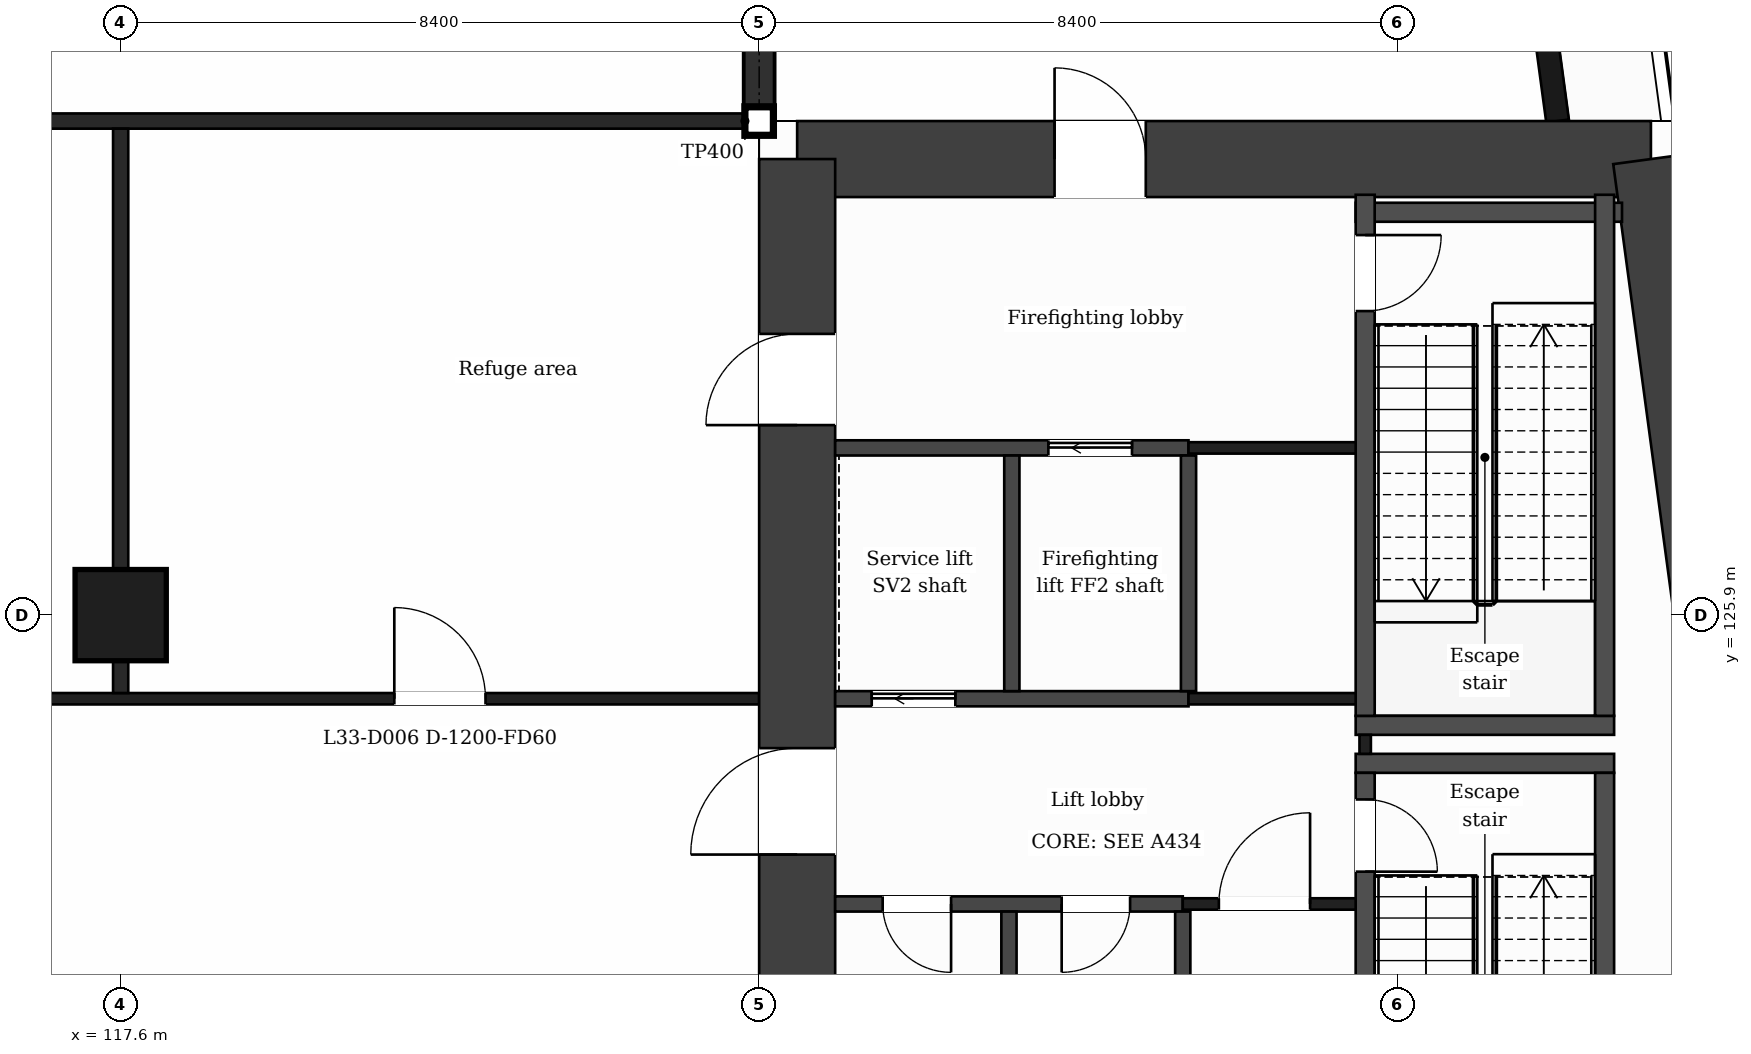
"""IFC4 building model, lengths in metres.
Left out: names, types, materials, properties, quantities, classifications, styles, units other than length and angle.
Written with IfcOpenShell. Run it as: python <this file> out.ifc"""

import sys

from ifc_helpers import new_model, si_unit, direction, frame, frame_2d, origin, origin_2d, place, context, subcontext, project, spatial, rectangle, extrude, element, fill, save


model = new_model("IFC4")
c1 = context("Model", 3, precision=1e-05, world=origin(), true_north=direction((0.0, 1.0)))
c2 = subcontext(c1, "Body", "Model", "MODEL_VIEW")
j1 = project(units=[si_unit("LENGTHUNIT", "METRE"), si_unit("PLANEANGLEUNIT", "RADIAN")], contexts=[c1])
p1 = place(None, origin())
s1 = spatial("IfcSite", under=j1, at=p1, CompositionType="ELEMENT")
p2 = place(p1, origin())
s2 = spatial("IfcBuilding", under=s1, at=p2, CompositionType="ELEMENT")
p3 = place(p2, frame((0.0, 0.0, 142.8)))
s3 = spatial("IfcBuildingStorey", under=s2, at=p3, CompositionType="ELEMENT", Elevation=142.8)
p4 = place(p3, frame((126.5, 131.9, 0.0), z_axis=(0.0, 0.0, 1.0), x_axis=(1.0, 0.0, 0.0)))
e1 = element("IfcWall", 1, at=p4, inside=s3, PredefinedType="SHEAR", context=c2, shape_type="SweptSolid", body=[
    extrude(rectangle(XDim=11.232, YDim=1.0, at=frame_2d((5.616, 0.0))), origin(), (0.0, 0.0, 1.0), 5.0),
])
p5 = place(p4, frame((3.386, 0.0, 0.0)))
e2 = element("IfcOpeningElement", 2, at=p5, cuts=e1, PredefinedType="OPENING", context=c2, shape_type="SweptSolid", body=[
    extrude(rectangle(XDim=1.2, YDim=2.1, at=frame_2d((0.6, 1.05))), frame((0.0, 0.51, 0.0), z_axis=(0.0, -1.0, 0.0), x_axis=(1.0, 0.0, 0.0)), (0.0, 0.0, 1.0), 1.02),
])
p6 = place(p3, frame((137.732, 131.9, 0.0), z_axis=(0.0, 0.0, 1.0), x_axis=(0.133411141623, -0.991060778808, 0.0)))
e3 = element("IfcWall", 3, at=p6, inside=s3, PredefinedType="SHEAR", context=c2, shape_type="SweptSolid", body=[
    extrude(rectangle(XDim=21.189, YDim=1.0, at=frame_2d((10.595, 0.0))), origin(), (0.0, 0.0, 1.0), 5.0),
])
p7 = place(p3, frame((126.5, 110.9, 0.0), z_axis=(0.0, 0.0, 1.0), x_axis=(0.0, 1.0, 0.0)))
e4 = element("IfcWall", 4, at=p7, inside=s3, PredefinedType="SHEAR", context=c2, shape_type="SweptSolid", body=[
    extrude(rectangle(XDim=21.0, YDim=1.0, at=frame_2d((10.5, 0.0))), origin(), (0.0, 0.0, 1.0), 5.0),
])
p8 = place(p7, frame((17.5, 0.0, 0.0)))
e5 = element("IfcOpeningElement", 5, at=p8, cuts=e4, PredefinedType="OPENING", context=c2, shape_type="SweptSolid", body=[
    extrude(rectangle(XDim=1.2, YDim=2.1, at=frame_2d((0.6, 1.05))), frame((0.0, 0.51, 0.0), z_axis=(0.0, -1.0, 0.0), x_axis=(1.0, 0.0, 0.0)), (0.0, 0.0, 1.0), 1.02),
])
p9 = place(p7, frame((11.85, 0.0, 0.0)))
e6 = element("IfcOpeningElement", 6, at=p9, cuts=e4, PredefinedType="OPENING", context=c2, shape_type="SweptSolid", body=[
    extrude(rectangle(XDim=1.4, YDim=2.1, at=frame_2d((0.7, 1.05))), frame((0.0, 0.51, 0.0), z_axis=(0.0, -1.0, 0.0), x_axis=(1.0, 0.0, 0.0)), (0.0, 0.0, 1.0), 1.02),
])
p10 = place(p3, frame((117.6, 125.9, 0.0), z_axis=(0.0, 0.0, 1.0), x_axis=(1.0, 0.0, 0.0)))
e7 = element("IfcColumn", 7, at=p10, inside=s3, PredefinedType="COLUMN", context=c2, shape_type="SweptSolid", body=[
    extrude(rectangle(XDim=1.2, YDim=1.2, at=origin_2d()), origin(), (0.0, 0.0, 1.0), 5.0),
])
p11 = place(p3, frame((136.504, 132.4, 0.0), z_axis=(0.0, 0.0, 1.0), x_axis=(-0.133399697462, 0.99106231929, 0.0)))
e8 = element("IfcWall", 8, at=p11, inside=s3, PredefinedType="SOLIDWALL", context=c2, shape_type="SweptSolid", body=[
    extrude(rectangle(XDim=6.74, YDim=0.3, at=frame_2d((3.37, 0.0))), origin(), (0.0, 0.0, 1.0), 4.68),
])
p12 = place(p11, frame((1.115, 0.0, 0.0)))
e9 = element("IfcOpeningElement", 9, at=p12, cuts=e8, PredefinedType="OPENING", context=c2, shape_type="SweptSolid", body=[
    extrude(rectangle(XDim=1.2, YDim=2.4, at=frame_2d((0.6, 1.2))), frame((0.0, 0.16, 0.0), z_axis=(0.0, -1.0, 0.0), x_axis=(1.0, 0.0, 0.0)), (0.0, 0.0, 1.0), 0.32),
])
p13 = place(p3, frame((127.0, 122.1, 0.0), z_axis=(0.0, 0.0, 1.0), x_axis=(1.0, 0.0, 0.0)))
e10 = element("IfcWall", 10, at=p13, inside=s3, PredefinedType="PARTITIONING", context=c2, shape_type="SweptSolid", body=[
    extrude(rectangle(XDim=4.573, YDim=0.2, at=frame_2d((2.287, 0.0))), origin(), (0.0, 0.0, 1.0), 4.68),
])
p14 = place(p13, frame((2.98, 0.0, 0.0)))
e11 = element("IfcOpeningElement", 11, at=p14, cuts=e10, PredefinedType="OPENING", context=c2, shape_type="SweptSolid", body=[
    extrude(rectangle(XDim=0.9, YDim=2.1, at=frame_2d((0.45, 1.05))), frame((0.0, 0.11, 0.0), z_axis=(0.0, -1.0, 0.0), x_axis=(1.0, 0.0, 0.0)), (0.0, 0.0, 1.0), 0.22),
])
p15 = place(p13, frame((0.625, 0.0, 0.0)))
e12 = element("IfcOpeningElement", 12, at=p15, cuts=e10, PredefinedType="OPENING", context=c2, shape_type="SweptSolid", body=[
    extrude(rectangle(XDim=0.9, YDim=2.1, at=frame_2d((0.45, 1.05))), frame((0.0, 0.11, 0.0), z_axis=(0.0, -1.0, 0.0), x_axis=(1.0, 0.0, 0.0)), (0.0, 0.0, 1.0), 0.22),
])
p16 = place(p3, frame((131.573, 122.1, 0.0), z_axis=(0.0, 0.0, 1.0), x_axis=(1.0, 0.0, 0.0)))
e13 = element("IfcWall", 13, at=p16, inside=s3, PredefinedType="PARTITIONING", context=c2, shape_type="SweptSolid", body=[
    extrude(rectangle(XDim=2.4, YDim=0.15, at=frame_2d((1.2, 0.0))), origin(), (0.0, 0.0, 1.0), 4.68),
])
p17 = place(p16, frame((0.475, 0.0, 0.0)))
e14 = element("IfcOpeningElement", 14, at=p17, cuts=e13, PredefinedType="OPENING", context=c2, shape_type="SweptSolid", body=[
    extrude(rectangle(XDim=1.2, YDim=2.1, at=frame_2d((0.6, 1.05))), frame((0.0, 0.085, 0.0), z_axis=(0.0, -1.0, 0.0), x_axis=(1.0, 0.0, 0.0)), (0.0, 0.0, 1.0), 0.17),
])
for number, where, z_axis, x_axis in (
    (15, (133.848, 123.95, 0.0), (0.0, 0.0, 1.0), (1.0, 0.0, 0.0)),
    (16, (133.848, 124.45, 0.0), (0.0, 0.0, 1.0), (1.0, 0.0, 0.0)),
):
    element("IfcWall", number, at=place(p3, frame(where, z_axis=z_axis, x_axis=x_axis)), inside=s3, PredefinedType="PARTITIONING", context=c2, shape_type="SweptSolid", body=[
        extrude(rectangle(XDim=3.4, YDim=0.25, at=frame_2d((1.7, 0.0))), origin(), (0.0, 0.0, 1.0), 4.68),
    ])
p18 = place(p3, frame((127.0, 124.8, 0.0), z_axis=(0.0, 0.0, 1.0), x_axis=(1.0, 0.0, 0.0)))
e17 = element("IfcWall", 17, at=p18, inside=s3, PredefinedType="PARTITIONING", context=c2, shape_type="SweptSolid", body=[
    extrude(rectangle(XDim=4.649, YDim=0.2, at=frame_2d((2.324, 0.0))), origin(), (0.0, 0.0, 1.0), 4.68),
])
p19 = place(p18, frame((0.481, 0.0, 0.0)))
e18 = element("IfcOpeningElement", 18, at=p19, cuts=e17, PredefinedType="OPENING", context=c2, shape_type="SweptSolid", body=[
    extrude(rectangle(XDim=1.1, YDim=2.1, at=frame_2d((0.55, 1.05))), frame((0.0, 0.11, 0.0), z_axis=(0.0, -1.0, 0.0), x_axis=(1.0, 0.0, 0.0)), (0.0, 0.0, 1.0), 0.22),
])
p20 = place(p3, frame((131.649, 124.8, 0.0), z_axis=(0.0, 0.0, 1.0), x_axis=(1.0, 0.0, 0.0)))
e19 = element("IfcWall", 19, at=p20, inside=s3, PredefinedType="PARTITIONING", context=c2, shape_type="SweptSolid", body=[
    extrude(rectangle(XDim=2.449, YDim=0.15, at=frame_2d((1.225, 0.0))), origin(), (0.0, 0.0, 1.0), 4.68),
])
p21 = place(p3, frame((100.8, 124.8, 0.0), z_axis=(0.0, 0.0, 1.0), x_axis=(1.0, 0.0, 0.0)))
e20 = element("IfcWall", 20, at=p21, inside=s3, PredefinedType="PARTITIONING", context=c2, shape_type="SweptSolid", body=[
    extrude(rectangle(XDim=25.2, YDim=0.15, at=frame_2d((12.6, 0.0))), origin(), (0.0, 0.0, 1.0), 4.68),
])
p22 = place(p21, frame((3.6, 0.0, 0.0)))
e21 = element("IfcOpeningElement", 21, at=p22, cuts=e20, PredefinedType="OPENING", context=c2, shape_type="SweptSolid", body=[
    extrude(rectangle(XDim=1.2, YDim=2.1, at=frame_2d((0.6, 1.05))), frame((0.0, 0.085, 0.0), z_axis=(0.0, -1.0, 0.0), x_axis=(1.0, 0.0, 0.0)), (0.0, 0.0, 1.0), 0.17),
])
p23 = place(p21, frame((12.0, 0.0, 0.0)))
e22 = element("IfcOpeningElement", 22, at=p23, cuts=e20, PredefinedType="OPENING", context=c2, shape_type="SweptSolid", body=[
    extrude(rectangle(XDim=1.2, YDim=2.1, at=frame_2d((0.6, 1.05))), frame((0.0, 0.085, 0.0), z_axis=(0.0, -1.0, 0.0), x_axis=(1.0, 0.0, 0.0)), (0.0, 0.0, 1.0), 0.17),
])
p24 = place(p21, frame((20.4, 0.0, 0.0)))
e23 = element("IfcOpeningElement", 23, at=p24, cuts=e20, PredefinedType="OPENING", context=c2, shape_type="SweptSolid", body=[
    extrude(rectangle(XDim=1.2, YDim=2.1, at=frame_2d((0.6, 1.05))), frame((0.0, 0.085, 0.0), z_axis=(0.0, -1.0, 0.0), x_axis=(1.0, 0.0, 0.0)), (0.0, 0.0, 1.0), 0.17),
])
p25 = place(p3, frame((127.0, 128.1, 0.0), z_axis=(0.0, 0.0, 1.0), x_axis=(1.0, 0.0, 0.0)))
e24 = element("IfcWall", 24, at=p25, inside=s3, PredefinedType="PARTITIONING", context=c2, shape_type="SweptSolid", body=[
    extrude(rectangle(XDim=4.649, YDim=0.2, at=frame_2d((2.324, 0.0))), origin(), (0.0, 0.0, 1.0), 4.68),
])
p26 = place(p25, frame((2.805, 0.0, 0.0)))
e25 = element("IfcOpeningElement", 25, at=p26, cuts=e24, PredefinedType="OPENING", context=c2, shape_type="SweptSolid", body=[
    extrude(rectangle(XDim=1.1, YDim=2.1, at=frame_2d((0.55, 1.05))), frame((0.0, 0.11, 0.0), z_axis=(0.0, -1.0, 0.0), x_axis=(1.0, 0.0, 0.0)), (0.0, 0.0, 1.0), 0.22),
])
p27 = place(p3, frame((131.649, 128.1, 0.0), z_axis=(0.0, 0.0, 1.0), x_axis=(1.0, 0.0, 0.0)))
e26 = element("IfcWall", 26, at=p27, inside=s3, PredefinedType="PARTITIONING", context=c2, shape_type="SweptSolid", body=[
    extrude(rectangle(XDim=2.324, YDim=0.15, at=frame_2d((1.162, 0.0))), origin(), (0.0, 0.0, 1.0), 4.68),
])
p28 = place(p3, frame((133.848, 131.2, 0.0), z_axis=(0.0, 0.0, 1.0), x_axis=(1.0, 0.0, 0.0)))
e27 = element("IfcWall", 27, at=p28, inside=s3, PredefinedType="PARTITIONING", context=c2, shape_type="SweptSolid", body=[
    extrude(rectangle(XDim=3.504, YDim=0.25, at=frame_2d((1.752, 0.0))), origin(), (0.0, 0.0, 1.0), 4.68),
])
p29 = place(p3, frame((100.7, 132.4, 0.0), z_axis=(0.0, 0.0, 1.0), x_axis=(1.0, 0.0, 0.0)))
e28 = element("IfcWall", 28, at=p29, inside=s3, PredefinedType="PARTITIONING", context=c2, shape_type="SweptSolid", body=[
    extrude(rectangle(XDim=25.4, YDim=0.2, at=frame_2d((12.7, 0.0))), origin(), (0.0, 0.0, 1.0), 4.68),
])
p30 = place(p29, frame((3.7, 0.0, 0.0)))
e29 = element("IfcOpeningElement", 29, at=p30, cuts=e28, PredefinedType="OPENING", context=c2, shape_type="SweptSolid", body=[
    extrude(rectangle(XDim=1.2, YDim=2.1, at=frame_2d((0.6, 1.05))), frame((0.0, 0.11, 0.0), z_axis=(0.0, -1.0, 0.0), x_axis=(1.0, 0.0, 0.0)), (0.0, 0.0, 1.0), 0.22),
])
p31 = place(p3, frame((117.6, 124.875, 0.0), z_axis=(0.0, 0.0, 1.0), x_axis=(0.0, 1.0, 0.0)))
e30 = element("IfcWall", 30, at=p31, inside=s3, PredefinedType="PARTITIONING", context=c2, shape_type="SweptSolid", body=[
    extrude(rectangle(XDim=7.425, YDim=0.2, at=frame_2d((3.712, 0.0))), origin(), (0.0, 0.0, 1.0), 4.68),
])
p32 = place(p3, frame((126.0, 132.5, 0.0), z_axis=(0.0, 0.0, 1.0), x_axis=(0.0, 1.0, 0.0)))
e31 = element("IfcWall", 31, at=p32, inside=s3, PredefinedType="PARTITIONING", context=c2, shape_type="SweptSolid", body=[
    extrude(rectangle(XDim=10.51, YDim=0.2, at=frame_2d((5.255, 0.0))), origin(), (0.0, 0.0, 1.0), 4.68),
])
for number, where, z_axis, x_axis in (
    (32, (129.287, 118.9, 0.0), (0.0, 0.0, 1.0), (0.0, 1.0, 0.0)),
    (33, (129.324, 124.9, 0.0), (0.0, 0.0, 1.0), (0.0, 1.0, 0.0)),
):
    element("IfcWall", number, at=place(p3, frame(where, z_axis=z_axis, x_axis=x_axis)), inside=s3, PredefinedType="PARTITIONING", context=c2, shape_type="SweptSolid", body=[
        extrude(rectangle(XDim=3.1, YDim=0.2, at=frame_2d((1.55, 0.0))), origin(), (0.0, 0.0, 1.0), 4.68),
    ])
p33 = place(p3, frame((131.573, 116.97, 0.0), z_axis=(0.0, 0.0, 1.0), x_axis=(0.0, 1.0, 0.0)))
e34 = element("IfcWall", 34, at=p33, inside=s3, PredefinedType="PARTITIONING", context=c2, shape_type="SweptSolid", body=[
    extrude(rectangle(XDim=5.03, YDim=0.2, at=frame_2d((2.515, 0.0))), origin(), (0.0, 0.0, 1.0), 4.68),
])
p34 = place(p33, frame((0.58, 0.0, 0.0)))
e35 = element("IfcOpeningElement", 35, at=p34, cuts=e34, PredefinedType="OPENING", context=c2, shape_type="SweptSolid", body=[
    extrude(rectangle(XDim=0.9, YDim=2.1, at=frame_2d((0.45, 1.05))), frame((0.0, 0.11, 0.0), z_axis=(0.0, -1.0, 0.0), x_axis=(1.0, 0.0, 0.0)), (0.0, 0.0, 1.0), 0.22),
])
p35 = place(p3, frame((131.649, 124.9, 0.0), z_axis=(0.0, 0.0, 1.0), x_axis=(0.0, 1.0, 0.0)))
e36 = element("IfcWall", 36, at=p35, inside=s3, PredefinedType="PARTITIONING", context=c2, shape_type="SweptSolid", body=[
    extrude(rectangle(XDim=3.1, YDim=0.2, at=frame_2d((1.55, 0.0))), origin(), (0.0, 0.0, 1.0), 4.68),
])
p36 = place(p3, frame((133.973, 124.075, 0.0), z_axis=(0.0, 0.0, 1.0), x_axis=(0.0, 1.0, 0.0)))
e37 = element("IfcWall", 37, at=p36, inside=s3, PredefinedType="PARTITIONING", context=c2, shape_type="SweptSolid", body=[
    extrude(rectangle(XDim=0.25, YDim=0.15, at=frame_2d((0.125, 0.0))), origin(), (0.0, 0.0, 1.0), 4.68),
])
p37 = place(p3, frame((133.973, 116.97, 0.0), z_axis=(0.0, 0.0, 1.0), x_axis=(0.0, 1.0, 0.0)))
e38 = element("IfcWall", 38, at=p37, inside=s3, PredefinedType="PARTITIONING", context=c2, shape_type="SweptSolid", body=[
    extrude(rectangle(XDim=6.855, YDim=0.25, at=frame_2d((3.427, 0.0))), origin(), (0.0, 0.0, 1.0), 4.68),
])
p38 = place(p37, frame((5.555, 0.0, 0.0)))
e39 = element("IfcOpeningElement", 39, at=p38, cuts=e38, PredefinedType="OPENING", context=c2, shape_type="SweptSolid", body=[
    extrude(rectangle(XDim=0.95, YDim=2.1, at=frame_2d((0.475, 1.05))), frame((0.0, 0.135, 0.0), z_axis=(0.0, -1.0, 0.0), x_axis=(1.0, 0.0, 0.0)), (0.0, 0.0, 1.0), 0.27),
])
p39 = place(p3, frame((133.973, 124.575, 0.0), z_axis=(0.0, 0.0, 1.0), x_axis=(0.0, 1.0, 0.0)))
e40 = element("IfcWall", 40, at=p39, inside=s3, PredefinedType="PARTITIONING", context=c2, shape_type="SweptSolid", body=[
    extrude(rectangle(XDim=6.855, YDim=0.25, at=frame_2d((3.427, 0.0))), origin(), (0.0, 0.0, 1.0), 4.68),
])
p40 = place(p39, frame((5.325, 0.0, 0.0)))
e41 = element("IfcOpeningElement", 41, at=p40, cuts=e40, PredefinedType="OPENING", context=c2, shape_type="SweptSolid", body=[
    extrude(rectangle(XDim=1.0, YDim=2.1, at=frame_2d((0.5, 1.05))), frame((0.0, 0.135, 0.0), z_axis=(0.0, -1.0, 0.0), x_axis=(1.0, 0.0, 0.0)), (0.0, 0.0, 1.0), 0.27),
])
for number, where, z_axis, x_axis in (
    (42, (137.123, 116.97, 0.0), (0.0, 0.0, 1.0), (0.0, 1.0, 0.0)),
    (43, (137.123, 124.575, 0.0), (0.0, 0.0, 1.0), (0.0, 1.0, 0.0)),
):
    element("IfcWall", number, at=place(p3, frame(where, z_axis=z_axis, x_axis=x_axis)), inside=s3, PredefinedType="PARTITIONING", context=c2, shape_type="SweptSolid", body=[
        extrude(rectangle(XDim=6.855, YDim=0.25, at=frame_2d((3.427, 0.0))), origin(), (0.0, 0.0, 1.0), 4.68),
    ])
p41 = place(p24, origin())
e44 = element("IfcDoor", 44, at=p41, inside=s3, OperationType="SINGLE_SWING_LEFT", PredefinedType="DOOR", context=c2, shape_type="SweptSolid", body=[
    extrude(rectangle(XDim=1.2, YDim=2.1, at=frame_2d((0.6, 1.05))), frame((0.0, 0.025, 0.0), z_axis=(0.0, -1.0, 0.0), x_axis=(1.0, 0.0, 0.0)), (0.0, 0.0, 1.0), 0.05),
])
fill(e23, e44)
p42 = place(p17, origin())
e45 = element("IfcDoor", 45, at=p42, inside=s3, OperationType="SINGLE_SWING_RIGHT", PredefinedType="DOOR", context=c2, shape_type="SweptSolid", body=[
    extrude(rectangle(XDim=1.2, YDim=2.1, at=frame_2d((0.6, 1.05))), frame((0.0, 0.025, 0.0), z_axis=(0.0, -1.0, 0.0), x_axis=(1.0, 0.0, 0.0)), (0.0, 0.0, 1.0), 0.05),
])
fill(e14, e45)
p43 = place(p26, origin())
e46 = element("IfcDoor", 46, at=p43, inside=s3, OperationType="SLIDING_TO_LEFT", PredefinedType="DOOR", context=c2, shape_type="SweptSolid", body=[
    extrude(rectangle(XDim=1.1, YDim=2.1, at=frame_2d((0.55, 1.05))), frame((0.0, 0.025, 0.0), z_axis=(0.0, -1.0, 0.0), x_axis=(1.0, 0.0, 0.0)), (0.0, 0.0, 1.0), 0.05),
])
fill(e25, e46)
p44 = place(p19, origin())
e47 = element("IfcDoor", 47, at=p44, inside=s3, OperationType="SLIDING_TO_LEFT", PredefinedType="DOOR", context=c2, shape_type="SweptSolid", body=[
    extrude(rectangle(XDim=1.1, YDim=2.1, at=frame_2d((0.55, 1.05))), frame((0.0, 0.025, 0.0), z_axis=(0.0, -1.0, 0.0), x_axis=(1.0, 0.0, 0.0)), (0.0, 0.0, 1.0), 0.05),
])
fill(e18, e47)
p45 = place(p14, origin())
e48 = element("IfcDoor", 48, at=p45, inside=s3, OperationType="SINGLE_SWING_LEFT", PredefinedType="DOOR", context=c2, shape_type="SweptSolid", body=[
    extrude(rectangle(XDim=0.9, YDim=2.1, at=frame_2d((0.45, 1.05))), frame((0.0, 0.025, 0.0), z_axis=(0.0, -1.0, 0.0), x_axis=(1.0, 0.0, 0.0)), (0.0, 0.0, 1.0), 0.05),
])
fill(e11, e48)
p46 = place(p15, origin())
e49 = element("IfcDoor", 49, at=p46, inside=s3, OperationType="SINGLE_SWING_RIGHT", PredefinedType="DOOR", context=c2, shape_type="SweptSolid", body=[
    extrude(rectangle(XDim=0.9, YDim=2.1, at=frame_2d((0.45, 1.05))), frame((0.0, 0.025, 0.0), z_axis=(0.0, -1.0, 0.0), x_axis=(1.0, 0.0, 0.0)), (0.0, 0.0, 1.0), 0.05),
])
fill(e12, e49)
p47 = place(p38, origin())
e50 = element("IfcDoor", 50, at=p47, inside=s3, OperationType="SINGLE_SWING_LEFT", PredefinedType="DOOR", context=c2, shape_type="SweptSolid", body=[
    extrude(rectangle(XDim=0.95, YDim=2.1, at=frame_2d((0.475, 1.05))), frame((0.0, 0.025, 0.0), z_axis=(0.0, -1.0, 0.0), x_axis=(1.0, 0.0, 0.0)), (0.0, 0.0, 1.0), 0.05),
])
fill(e39, e50)
p48 = place(p40, origin())
e51 = element("IfcDoor", 51, at=p48, inside=s3, OperationType="SINGLE_SWING_RIGHT", PredefinedType="DOOR", context=c2, shape_type="SweptSolid", body=[
    extrude(rectangle(XDim=1.0, YDim=2.1, at=frame_2d((0.5, 1.05))), frame((0.0, 0.025, 0.0), z_axis=(0.0, -1.0, 0.0), x_axis=(1.0, 0.0, 0.0)), (0.0, 0.0, 1.0), 0.05),
])
fill(e41, e51)
p49 = place(p5, origin())
e52 = element("IfcDoor", 52, at=p49, inside=s3, OperationType="SINGLE_SWING_LEFT", PredefinedType="DOOR", context=c2, shape_type="SweptSolid", body=[
    extrude(rectangle(XDim=1.2, YDim=2.1, at=frame_2d((0.6, 1.05))), frame((0.0, 0.025, 0.0), z_axis=(0.0, -1.0, 0.0), x_axis=(1.0, 0.0, 0.0)), (0.0, 0.0, 1.0), 0.05),
])
fill(e2, e52)
p50 = place(p8, origin())
e53 = element("IfcDoor", 53, at=p50, inside=s3, OperationType="SINGLE_SWING_LEFT", PredefinedType="DOOR", context=c2, shape_type="SweptSolid", body=[
    extrude(rectangle(XDim=1.2, YDim=2.1, at=frame_2d((0.6, 1.05))), frame((0.0, 0.025, 0.0), z_axis=(0.0, -1.0, 0.0), x_axis=(1.0, 0.0, 0.0)), (0.0, 0.0, 1.0), 0.05),
])
fill(e5, e53)
p51 = place(p9, origin())
e54 = element("IfcDoor", 54, at=p51, inside=s3, OperationType="SINGLE_SWING_LEFT", PredefinedType="DOOR", context=c2, shape_type="SweptSolid", body=[
    extrude(rectangle(XDim=1.4, YDim=2.1, at=frame_2d((0.7, 1.05))), frame((0.0, 0.025, 0.0), z_axis=(0.0, -1.0, 0.0), x_axis=(1.0, 0.0, 0.0)), (0.0, 0.0, 1.0), 0.05),
])
fill(e6, e54)
save(model, sys.argv[1])
